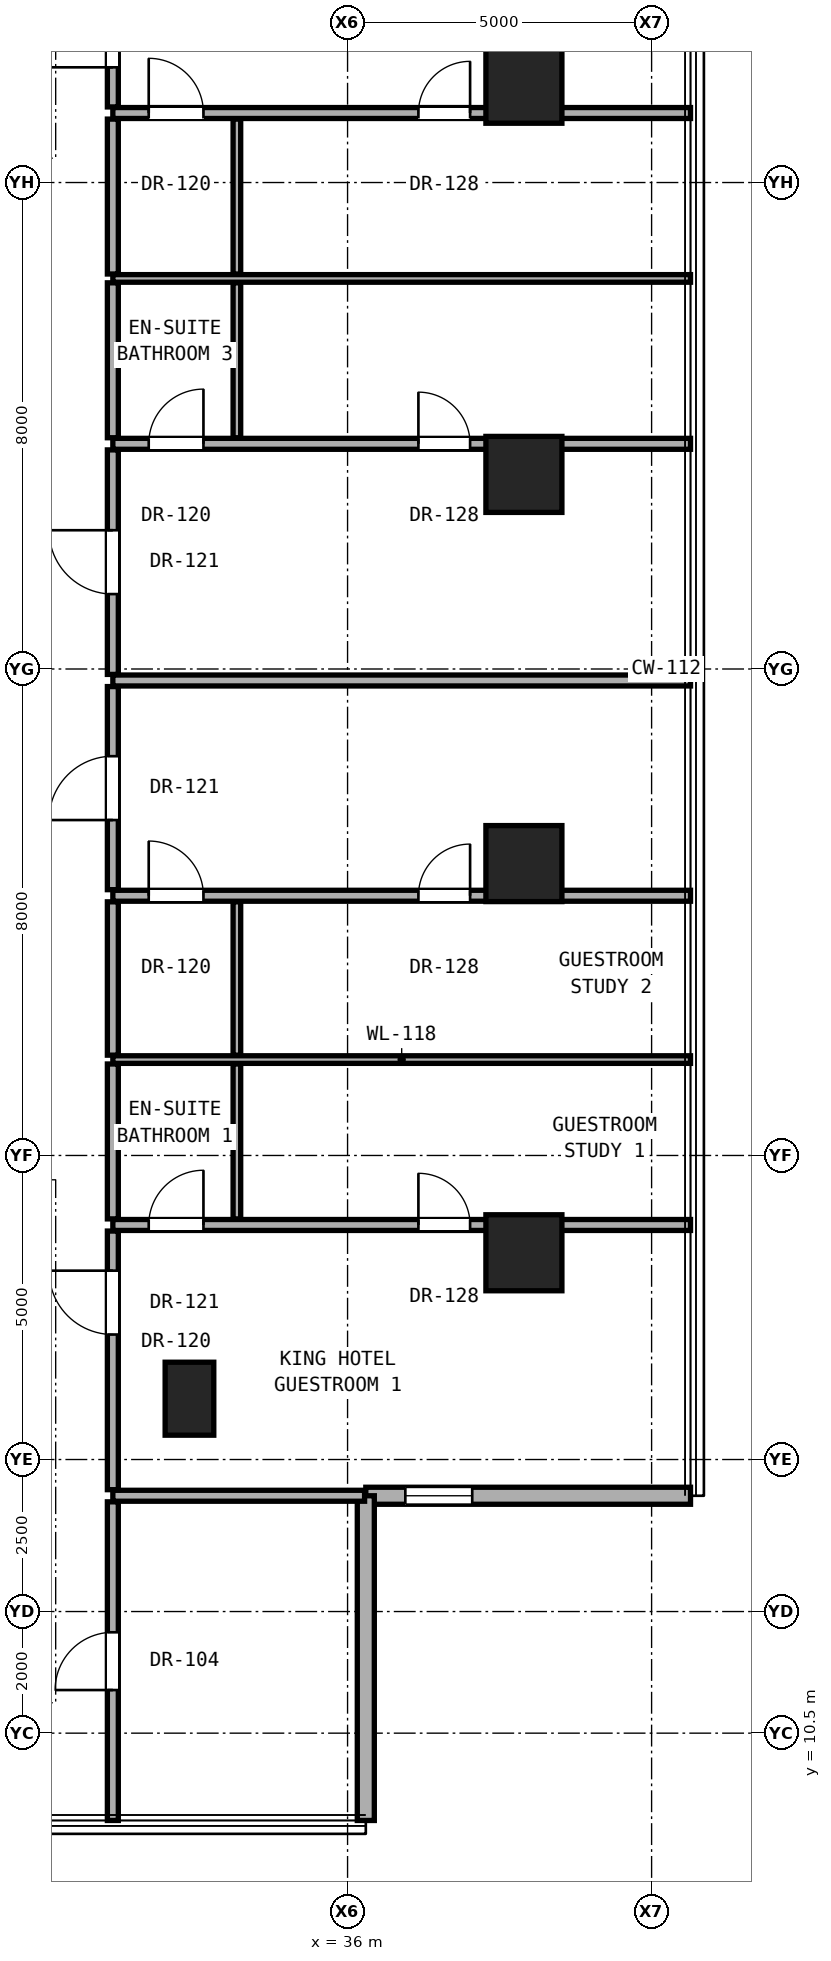
"""IFC4 building model, lengths in metres.
Left out: names, types, materials, properties, quantities, classifications, styles, units other than length and angle.
Written with IfcOpenShell. Run it as: python <this file> out.ifc"""

import sys

from ifc_helpers import new_model, si_unit, direction, frame, frame_2d, origin, origin_2d, place, context, subcontext, project, spatial, rectangle, hollow_rectangle, extrude, element, fill, save


model = new_model("IFC4")
c1 = context("Model", 3, precision=1e-05, world=origin(), true_north=direction((0.0, 1.0)))
c2 = subcontext(c1, "Body", "Model", "MODEL_VIEW")
j1 = project(units=[si_unit("LENGTHUNIT", "METRE"), si_unit("PLANEANGLEUNIT", "RADIAN")], contexts=[c1])
p1 = place(None, origin())
s1 = spatial("IfcSite", under=j1, at=p1, CompositionType="ELEMENT")
p2 = place(p1, origin())
s2 = spatial("IfcBuilding", under=s1, at=p2, CompositionType="ELEMENT")
p3 = place(p2, frame((0.0, 0.0, 58.7)))
s3 = spatial("IfcBuildingStorey", under=s2, at=p3, CompositionType="ELEMENT", Elevation=58.7)
for number, where, z_axis, x_axis in (
    (1, (38.9, 18.4, 0.0), (0.0, 0.0, 1.0), (1.0, 0.0, 0.0)),
    (2, (38.9, 24.8, 0.0), (0.0, 0.0, 1.0), (1.0, 0.0, 0.0)),
    (3, (38.9, 31.2, 0.0), (0.0, 0.0, 1.0), (1.0, 0.0, 0.0)),
    (4, (38.9, 37.6, 0.0), (0.0, 0.0, 1.0), (1.0, 0.0, 0.0)),
):
    element("IfcColumn", number, at=place(p3, frame(where, z_axis=z_axis, x_axis=x_axis)), inside=s3, PredefinedType="COLUMN", context=c2, shape_type="SweptSolid", body=[
        extrude(hollow_rectangle(XDim=1.25, YDim=1.25, WallThickness=0.07, at=origin_2d()), origin(), (0.0, 0.0, 1.0), 3.3),
    ])
p4 = place(p3, frame((33.4, 16.0, 0.0), z_axis=(0.0, 0.0, 1.0), x_axis=(1.0, 0.0, 0.0)))
e5 = element("IfcColumn", 5, at=p4, inside=s3, PredefinedType="PILASTER", context=c2, shape_type="SweptSolid", body=[
    extrude(rectangle(XDim=0.8, YDim=1.2, at=origin_2d()), origin(), (0.0, 0.0, 1.0), 3.3),
])
p5 = place(p3, frame((36.3, 14.404, 0.0), z_axis=(0.0, 0.0, 1.0), x_axis=(1.0, 0.0, 0.0)))
e6 = element("IfcWall", 6, at=p5, inside=s3, PredefinedType="SOLIDWALL", context=c2, shape_type="SweptSolid", body=[
    extrude(rectangle(XDim=5.34, YDim=0.28, at=frame_2d((2.67, 0.0))), origin(), (0.0, 0.0, 1.0), 3.04),
])
p6 = place(p5, frame((0.65, 0.0, 0.85)))
e7 = element("IfcOpeningElement", 7, at=p6, cuts=e6, PredefinedType="OPENING", context=c2, shape_type="SweptSolid", body=[
    extrude(rectangle(XDim=1.1, YDim=2.0, at=frame_2d((0.55, 1.0))), frame((0.0, 0.15, 0.0), z_axis=(0.0, -1.0, 0.0), x_axis=(1.0, 0.0, 0.0)), (0.0, 0.0, 1.0), 0.3),
])
p7 = place(p3, frame((36.3, 9.064, 0.0), z_axis=(0.0, 0.0, 1.0), x_axis=(0.0, 1.0, 0.0)))
e8 = element("IfcWall", 8, at=p7, inside=s3, PredefinedType="SOLIDWALL", context=c2, shape_type="SweptSolid", body=[
    extrude(rectangle(XDim=5.34, YDim=0.28, at=frame_2d((2.67, 0.0))), origin(), (0.0, 0.0, 1.0), 3.04),
])
p8 = place(p3, frame((32.14, 14.404, 0.0), z_axis=(0.0, 0.0, 1.0), x_axis=(1.0, 0.0, 0.0)))
e9 = element("IfcWall", 9, at=p8, inside=s3, PredefinedType="PARTITIONING", context=c2, shape_type="SweptSolid", body=[
    extrude(rectangle(XDim=4.14, YDim=0.18, at=frame_2d((2.07, 0.0))), origin(), (0.0, 0.0, 1.0), 3.06),
])
p9 = place(p3, frame((32.14, 18.857, 0.0), z_axis=(0.0, 0.0, 1.0), x_axis=(1.0, 0.0, 0.0)))
e10 = element("IfcWall", 10, at=p9, inside=s3, PredefinedType="PARTITIONING", context=c2, shape_type="SweptSolid", body=[
    extrude(rectangle(XDim=9.5, YDim=0.18, at=frame_2d((4.75, 0.0))), origin(), (0.0, 0.0, 1.0), 2.125),
])
p10 = place(p9, frame((5.025, 0.0, 0.0)))
e11 = element("IfcOpeningElement", 11, at=p10, cuts=e10, PredefinedType="OPENING", context=c2, shape_type="SweptSolid", body=[
    extrude(rectangle(XDim=0.85, YDim=2.01, at=frame_2d((0.425, 1.005))), frame((0.0, 0.1, 0.0), z_axis=(0.0, -1.0, 0.0), x_axis=(1.0, 0.0, 0.0)), (0.0, 0.0, 1.0), 0.2),
])
p11 = place(p9, frame((0.59, 0.0, 0.0)))
e12 = element("IfcOpeningElement", 12, at=p11, cuts=e10, PredefinedType="OPENING", context=c2, shape_type="SweptSolid", body=[
    extrude(rectangle(XDim=0.9, YDim=2.1, at=frame_2d((0.45, 1.05))), frame((0.0, 0.1, 0.0), z_axis=(0.0, -1.0, 0.0), x_axis=(1.0, 0.0, 0.0)), (0.0, 0.0, 1.0), 0.2),
])
p12 = place(p3, frame((32.14, 21.577, 0.0), z_axis=(0.0, 0.0, 1.0), x_axis=(1.0, 0.0, 0.0)))
e13 = element("IfcWall", 13, at=p12, inside=s3, PredefinedType="PARTITIONING", context=c2, shape_type="SweptSolid", body=[
    extrude(rectangle(XDim=9.5, YDim=0.125, at=frame_2d((4.75, 0.0))), origin(), (0.0, 0.0, 1.0), 2.125),
])
p13 = place(p3, frame((32.14, 24.271, 0.0), z_axis=(0.0, 0.0, 1.0), x_axis=(1.0, 0.0, 0.0)))
e14 = element("IfcWall", 14, at=p13, inside=s3, PredefinedType="PARTITIONING", context=c2, shape_type="SweptSolid", body=[
    extrude(rectangle(XDim=9.5, YDim=0.18, at=frame_2d((4.75, 0.0))), origin(), (0.0, 0.0, 1.0), 2.125),
])
p14 = place(p13, frame((5.025, 0.0, 0.0)))
e15 = element("IfcOpeningElement", 15, at=p14, cuts=e14, PredefinedType="OPENING", context=c2, shape_type="SweptSolid", body=[
    extrude(rectangle(XDim=0.85, YDim=2.01, at=frame_2d((0.425, 1.005))), frame((0.0, 0.1, 0.0), z_axis=(0.0, -1.0, 0.0), x_axis=(1.0, 0.0, 0.0)), (0.0, 0.0, 1.0), 0.2),
])
p15 = place(p13, frame((0.59, 0.0, 0.0)))
e16 = element("IfcOpeningElement", 16, at=p15, cuts=e14, PredefinedType="OPENING", context=c2, shape_type="SweptSolid", body=[
    extrude(rectangle(XDim=0.9, YDim=2.1, at=frame_2d((0.45, 1.05))), frame((0.0, 0.1, 0.0), z_axis=(0.0, -1.0, 0.0), x_axis=(1.0, 0.0, 0.0)), (0.0, 0.0, 1.0), 0.2),
])
p16 = place(p3, frame((32.14, 27.811, 0.0), z_axis=(0.0, 0.0, 1.0), x_axis=(1.0, 0.0, 0.0)))
e17 = element("IfcWall", 17, at=p16, inside=s3, PredefinedType="PARTITIONING", context=c2, shape_type="SweptSolid", body=[
    extrude(rectangle(XDim=9.5, YDim=0.18, at=frame_2d((4.75, 0.0))), origin(), (0.0, 0.0, 1.0), 2.125),
])
p17 = place(p3, frame((32.14, 31.703, 0.0), z_axis=(0.0, 0.0, 1.0), x_axis=(1.0, 0.0, 0.0)))
e18 = element("IfcWall", 18, at=p17, inside=s3, PredefinedType="PARTITIONING", context=c2, shape_type="SweptSolid", body=[
    extrude(rectangle(XDim=9.5, YDim=0.18, at=frame_2d((4.75, 0.0))), origin(), (0.0, 0.0, 1.0), 2.125),
])
p18 = place(p17, frame((5.025, 0.0, 0.0)))
e19 = element("IfcOpeningElement", 19, at=p18, cuts=e18, PredefinedType="OPENING", context=c2, shape_type="SweptSolid", body=[
    extrude(rectangle(XDim=0.85, YDim=2.01, at=frame_2d((0.425, 1.005))), frame((0.0, 0.1, 0.0), z_axis=(0.0, -1.0, 0.0), x_axis=(1.0, 0.0, 0.0)), (0.0, 0.0, 1.0), 0.2),
])
p19 = place(p17, frame((0.59, 0.0, 0.0)))
e20 = element("IfcOpeningElement", 20, at=p19, cuts=e18, PredefinedType="OPENING", context=c2, shape_type="SweptSolid", body=[
    extrude(rectangle(XDim=0.9, YDim=2.1, at=frame_2d((0.45, 1.05))), frame((0.0, 0.1, 0.0), z_axis=(0.0, -1.0, 0.0), x_axis=(1.0, 0.0, 0.0)), (0.0, 0.0, 1.0), 0.2),
])
p20 = place(p3, frame((32.14, 34.423, 0.0), z_axis=(0.0, 0.0, 1.0), x_axis=(1.0, 0.0, 0.0)))
e21 = element("IfcWall", 21, at=p20, inside=s3, PredefinedType="PARTITIONING", context=c2, shape_type="SweptSolid", body=[
    extrude(rectangle(XDim=9.5, YDim=0.125, at=frame_2d((4.75, 0.0))), origin(), (0.0, 0.0, 1.0), 2.125),
])
p21 = place(p3, frame((32.14, 37.143, 0.0), z_axis=(0.0, 0.0, 1.0), x_axis=(1.0, 0.0, 0.0)))
e22 = element("IfcWall", 22, at=p21, inside=s3, PredefinedType="PARTITIONING", context=c2, shape_type="SweptSolid", body=[
    extrude(rectangle(XDim=9.5, YDim=0.18, at=frame_2d((4.75, 0.0))), origin(), (0.0, 0.0, 1.0), 2.125),
])
p22 = place(p21, frame((5.025, 0.0, 0.0)))
e23 = element("IfcOpeningElement", 23, at=p22, cuts=e22, PredefinedType="OPENING", context=c2, shape_type="SweptSolid", body=[
    extrude(rectangle(XDim=0.85, YDim=2.01, at=frame_2d((0.425, 1.005))), frame((0.0, 0.1, 0.0), z_axis=(0.0, -1.0, 0.0), x_axis=(1.0, 0.0, 0.0)), (0.0, 0.0, 1.0), 0.2),
])
p23 = place(p21, frame((0.59, 0.0, 0.0)))
e24 = element("IfcOpeningElement", 24, at=p23, cuts=e22, PredefinedType="OPENING", context=c2, shape_type="SweptSolid", body=[
    extrude(rectangle(XDim=0.9, YDim=2.1, at=frame_2d((0.45, 1.05))), frame((0.0, 0.1, 0.0), z_axis=(0.0, -1.0, 0.0), x_axis=(1.0, 0.0, 0.0)), (0.0, 0.0, 1.0), 0.2),
])
p24 = place(p3, frame((32.14, 9.064, 0.0), z_axis=(0.0, 0.0, 1.0), x_axis=(0.0, 1.0, 0.0)))
e25 = element("IfcWall", 25, at=p24, inside=s3, PredefinedType="PARTITIONING", context=c2, shape_type="SweptSolid", body=[
    extrude(rectangle(XDim=5.24, YDim=0.18, at=frame_2d((2.62, 0.0))), origin(), (0.0, 0.0, 1.0), 3.06),
])
p25 = place(p24, frame((2.145, 0.0, 0.0)))
e26 = element("IfcOpeningElement", 26, at=p25, cuts=e25, PredefinedType="OPENING", context=c2, shape_type="SweptSolid", body=[
    extrude(rectangle(XDim=0.95, YDim=2.15, at=frame_2d((0.475, 1.075))), frame((0.0, 0.1, 0.0), z_axis=(0.0, -1.0, 0.0), x_axis=(1.0, 0.0, 0.0)), (0.0, 0.0, 1.0), 0.2),
])
p26 = place(p3, frame((32.14, 14.504, 0.0), z_axis=(0.0, 0.0, 1.0), x_axis=(0.0, 1.0, 0.0)))
e27 = element("IfcWall", 27, at=p26, inside=s3, PredefinedType="PARTITIONING", context=c2, shape_type="SweptSolid", body=[
    extrude(rectangle(XDim=4.253, YDim=0.18, at=frame_2d((2.126, 0.0))), origin(), (0.0, 0.0, 1.0), 2.436),
])
p27 = place(p26, frame((2.552, 0.0, 0.0)))
e28 = element("IfcOpeningElement", 28, at=p27, cuts=e27, PredefinedType="OPENING", context=c2, shape_type="SweptSolid", body=[
    extrude(rectangle(XDim=1.05, YDim=2.2, at=frame_2d((0.525, 1.1))), frame((0.0, 0.1, 0.0), z_axis=(0.0, -1.0, 0.0), x_axis=(1.0, 0.0, 0.0)), (0.0, 0.0, 1.0), 0.2),
])
p28 = place(p3, frame((32.14, 18.957, 0.0), z_axis=(0.0, 0.0, 1.0), x_axis=(0.0, 1.0, 0.0)))
e29 = element("IfcWall", 29, at=p28, inside=s3, PredefinedType="PARTITIONING", context=c2, shape_type="SweptSolid", body=[
    extrude(rectangle(XDim=2.547, YDim=0.18, at=frame_2d((1.274, 0.0))), origin(), (0.0, 0.0, 1.0), 3.06),
])
p29 = place(p3, frame((32.14, 21.649, 0.0), z_axis=(0.0, 0.0, 1.0), x_axis=(0.0, 1.0, 0.0)))
e30 = element("IfcWall", 30, at=p29, inside=s3, PredefinedType="PARTITIONING", context=c2, shape_type="SweptSolid", body=[
    extrude(rectangle(XDim=2.521, YDim=0.18, at=frame_2d((1.261, 0.0))), origin(), (0.0, 0.0, 1.0), 3.06),
])
p30 = place(p3, frame((32.14, 24.371, 0.0), z_axis=(0.0, 0.0, 1.0), x_axis=(0.0, 1.0, 0.0)))
e31 = element("IfcWall", 31, at=p30, inside=s3, PredefinedType="PARTITIONING", context=c2, shape_type="SweptSolid", body=[
    extrude(rectangle(XDim=3.34, YDim=0.18, at=frame_2d((1.67, 0.0))), origin(), (0.0, 0.0, 1.0), 2.279),
])
p31 = place(p30, frame((1.145, 0.0, 0.0)))
e32 = element("IfcOpeningElement", 32, at=p31, cuts=e31, PredefinedType="OPENING", context=c2, shape_type="SweptSolid", body=[
    extrude(rectangle(XDim=1.05, YDim=2.2, at=frame_2d((0.525, 1.1))), frame((0.0, 0.1, 0.0), z_axis=(0.0, -1.0, 0.0), x_axis=(1.0, 0.0, 0.0)), (0.0, 0.0, 1.0), 0.2),
])
p32 = place(p3, frame((32.14, 27.911, 0.0), z_axis=(0.0, 0.0, 1.0), x_axis=(0.0, 1.0, 0.0)))
e33 = element("IfcWall", 33, at=p32, inside=s3, PredefinedType="PARTITIONING", context=c2, shape_type="SweptSolid", body=[
    extrude(rectangle(XDim=3.692, YDim=0.18, at=frame_2d((1.846, 0.0))), origin(), (0.0, 0.0, 1.0), 2.279),
])
p33 = place(p32, frame((1.321, 0.0, 0.0)))
e34 = element("IfcOpeningElement", 34, at=p33, cuts=e33, PredefinedType="OPENING", context=c2, shape_type="SweptSolid", body=[
    extrude(rectangle(XDim=1.05, YDim=2.2, at=frame_2d((0.525, 1.1))), frame((0.0, 0.1, 0.0), z_axis=(0.0, -1.0, 0.0), x_axis=(1.0, 0.0, 0.0)), (0.0, 0.0, 1.0), 0.2),
])
p34 = place(p3, frame((32.14, 31.803, 0.0), z_axis=(0.0, 0.0, 1.0), x_axis=(0.0, 1.0, 0.0)))
e35 = element("IfcWall", 35, at=p34, inside=s3, PredefinedType="PARTITIONING", context=c2, shape_type="SweptSolid", body=[
    extrude(rectangle(XDim=2.548, YDim=0.18, at=frame_2d((1.274, 0.0))), origin(), (0.0, 0.0, 1.0), 3.06),
])
p35 = place(p3, frame((32.14, 34.496, 0.0), z_axis=(0.0, 0.0, 1.0), x_axis=(0.0, 1.0, 0.0)))
e36 = element("IfcWall", 36, at=p35, inside=s3, PredefinedType="PARTITIONING", context=c2, shape_type="SweptSolid", body=[
    extrude(rectangle(XDim=2.547, YDim=0.18, at=frame_2d((1.274, 0.0))), origin(), (0.0, 0.0, 1.0), 3.06),
])
p36 = place(p3, frame((32.14, 37.243, 0.0), z_axis=(0.0, 0.0, 1.0), x_axis=(0.0, 1.0, 0.0)))
e37 = element("IfcWall", 37, at=p36, inside=s3, PredefinedType="PARTITIONING", context=c2, shape_type="SweptSolid", body=[
    extrude(rectangle(XDim=4.253, YDim=0.18, at=frame_2d((2.126, 0.0))), origin(), (0.0, 0.0, 1.0), 2.436),
])
p37 = place(p36, frame((0.652, 0.0, 0.0)))
e38 = element("IfcOpeningElement", 38, at=p37, cuts=e37, PredefinedType="OPENING", context=c2, shape_type="SweptSolid", body=[
    extrude(rectangle(XDim=1.05, YDim=2.2, at=frame_2d((0.525, 1.1))), frame((0.0, 0.1, 0.0), z_axis=(0.0, -1.0, 0.0), x_axis=(1.0, 0.0, 0.0)), (0.0, 0.0, 1.0), 0.2),
])
p38 = place(p3, frame((34.18, 18.957, 0.0), z_axis=(0.0, 0.0, 1.0), x_axis=(0.0, 1.0, 0.0)))
e39 = element("IfcWall", 39, at=p38, inside=s3, PredefinedType="PARTITIONING", context=c2, shape_type="SweptSolid", body=[
    extrude(rectangle(XDim=2.547, YDim=0.125, at=frame_2d((1.274, 0.0))), origin(), (0.0, 0.0, 1.0), 3.06),
])
p39 = place(p3, frame((34.18, 21.649, 0.0), z_axis=(0.0, 0.0, 1.0), x_axis=(0.0, 1.0, 0.0)))
e40 = element("IfcWall", 40, at=p39, inside=s3, PredefinedType="PARTITIONING", context=c2, shape_type="SweptSolid", body=[
    extrude(rectangle(XDim=2.521, YDim=0.125, at=frame_2d((1.261, 0.0))), origin(), (0.0, 0.0, 1.0), 3.06),
])
p40 = place(p3, frame((34.18, 31.803, 0.0), z_axis=(0.0, 0.0, 1.0), x_axis=(0.0, 1.0, 0.0)))
e41 = element("IfcWall", 41, at=p40, inside=s3, PredefinedType="PARTITIONING", context=c2, shape_type="SweptSolid", body=[
    extrude(rectangle(XDim=2.548, YDim=0.125, at=frame_2d((1.274, 0.0))), origin(), (0.0, 0.0, 1.0), 3.06),
])
p41 = place(p3, frame((34.18, 34.496, 0.0), z_axis=(0.0, 0.0, 1.0), x_axis=(0.0, 1.0, 0.0)))
e42 = element("IfcWall", 42, at=p41, inside=s3, PredefinedType="PARTITIONING", context=c2, shape_type="SweptSolid", body=[
    extrude(rectangle(XDim=2.547, YDim=0.125, at=frame_2d((1.274, 0.0))), origin(), (0.0, 0.0, 1.0), 3.06),
])
p42 = place(p6, origin())
e43 = element("IfcWindow", 43, at=p42, inside=s3, PartitioningType="SINGLE_PANEL", PredefinedType="WINDOW", context=c2, shape_type="SweptSolid", body=[
    extrude(rectangle(XDim=1.1, YDim=2.0, at=frame_2d((0.55, 1.0))), frame((0.0, 0.03, 0.0), z_axis=(0.0, -1.0, 0.0), x_axis=(1.0, 0.0, 0.0)), (0.0, 0.0, 1.0), 0.06),
])
fill(e7, e43)
p43 = place(p27, origin())
e44 = element("IfcDoor", 44, at=p43, inside=s3, OperationType="SINGLE_SWING_RIGHT", PredefinedType="DOOR", context=c2, shape_type="SweptSolid", body=[
    extrude(rectangle(XDim=1.05, YDim=2.2, at=frame_2d((0.525, 1.1))), frame((0.0, 0.025, 0.0), z_axis=(0.0, -1.0, 0.0), x_axis=(1.0, 0.0, 0.0)), (0.0, 0.0, 1.0), 0.05),
])
fill(e28, e44)
p44 = place(p10, origin())
e45 = element("IfcDoor", 45, at=p44, inside=s3, OperationType="SINGLE_SWING_LEFT", PredefinedType="DOOR", context=c2, shape_type="SweptSolid", body=[
    extrude(rectangle(XDim=0.85, YDim=2.01, at=frame_2d((0.425, 1.005))), frame((0.0, 0.025, 0.0), z_axis=(0.0, -1.0, 0.0), x_axis=(1.0, 0.0, 0.0)), (0.0, 0.0, 1.0), 0.05),
])
fill(e11, e45)
p45 = place(p11, origin())
e46 = element("IfcDoor", 46, at=p45, inside=s3, OperationType="SINGLE_SWING_RIGHT", PredefinedType="DOOR", context=c2, shape_type="SweptSolid", body=[
    extrude(rectangle(XDim=0.9, YDim=2.1, at=frame_2d((0.45, 1.05))), frame((0.0, 0.025, 0.0), z_axis=(0.0, -1.0, 0.0), x_axis=(1.0, 0.0, 0.0)), (0.0, 0.0, 1.0), 0.05),
])
fill(e12, e46)
p46 = place(p31, origin())
e47 = element("IfcDoor", 47, at=p46, inside=s3, OperationType="SINGLE_SWING_LEFT", PredefinedType="DOOR", context=c2, shape_type="SweptSolid", body=[
    extrude(rectangle(XDim=1.05, YDim=2.2, at=frame_2d((0.525, 1.1))), frame((0.0, 0.025, 0.0), z_axis=(0.0, -1.0, 0.0), x_axis=(1.0, 0.0, 0.0)), (0.0, 0.0, 1.0), 0.05),
])
fill(e32, e47)
p47 = place(p14, origin())
e48 = element("IfcDoor", 48, at=p47, inside=s3, OperationType="SINGLE_SWING_RIGHT", PredefinedType="DOOR", context=c2, shape_type="SweptSolid", body=[
    extrude(rectangle(XDim=0.85, YDim=2.01, at=frame_2d((0.425, 1.005))), frame((0.0, 0.025, 0.0), z_axis=(0.0, -1.0, 0.0), x_axis=(1.0, 0.0, 0.0)), (0.0, 0.0, 1.0), 0.05),
])
fill(e15, e48)
p48 = place(p15, origin())
e49 = element("IfcDoor", 49, at=p48, inside=s3, OperationType="SINGLE_SWING_LEFT", PredefinedType="DOOR", context=c2, shape_type="SweptSolid", body=[
    extrude(rectangle(XDim=0.9, YDim=2.1, at=frame_2d((0.45, 1.05))), frame((0.0, 0.025, 0.0), z_axis=(0.0, -1.0, 0.0), x_axis=(1.0, 0.0, 0.0)), (0.0, 0.0, 1.0), 0.05),
])
fill(e16, e49)
p49 = place(p33, origin())
e50 = element("IfcDoor", 50, at=p49, inside=s3, OperationType="SINGLE_SWING_RIGHT", PredefinedType="DOOR", context=c2, shape_type="SweptSolid", body=[
    extrude(rectangle(XDim=1.05, YDim=2.2, at=frame_2d((0.525, 1.1))), frame((0.0, 0.025, 0.0), z_axis=(0.0, -1.0, 0.0), x_axis=(1.0, 0.0, 0.0)), (0.0, 0.0, 1.0), 0.05),
])
fill(e34, e50)
p50 = place(p18, origin())
e51 = element("IfcDoor", 51, at=p50, inside=s3, OperationType="SINGLE_SWING_LEFT", PredefinedType="DOOR", context=c2, shape_type="SweptSolid", body=[
    extrude(rectangle(XDim=0.85, YDim=2.01, at=frame_2d((0.425, 1.005))), frame((0.0, 0.025, 0.0), z_axis=(0.0, -1.0, 0.0), x_axis=(1.0, 0.0, 0.0)), (0.0, 0.0, 1.0), 0.05),
])
fill(e19, e51)
p51 = place(p19, origin())
e52 = element("IfcDoor", 52, at=p51, inside=s3, OperationType="SINGLE_SWING_RIGHT", PredefinedType="DOOR", context=c2, shape_type="SweptSolid", body=[
    extrude(rectangle(XDim=0.9, YDim=2.1, at=frame_2d((0.45, 1.05))), frame((0.0, 0.025, 0.0), z_axis=(0.0, -1.0, 0.0), x_axis=(1.0, 0.0, 0.0)), (0.0, 0.0, 1.0), 0.05),
])
fill(e20, e52)
p52 = place(p37, origin())
e53 = element("IfcDoor", 53, at=p52, inside=s3, OperationType="SINGLE_SWING_LEFT", PredefinedType="DOOR", context=c2, shape_type="SweptSolid", body=[
    extrude(rectangle(XDim=1.05, YDim=2.2, at=frame_2d((0.525, 1.1))), frame((0.0, 0.025, 0.0), z_axis=(0.0, -1.0, 0.0), x_axis=(1.0, 0.0, 0.0)), (0.0, 0.0, 1.0), 0.05),
])
fill(e38, e53)
p53 = place(p22, origin())
e54 = element("IfcDoor", 54, at=p53, inside=s3, OperationType="SINGLE_SWING_RIGHT", PredefinedType="DOOR", context=c2, shape_type="SweptSolid", body=[
    extrude(rectangle(XDim=0.85, YDim=2.01, at=frame_2d((0.425, 1.005))), frame((0.0, 0.025, 0.0), z_axis=(0.0, -1.0, 0.0), x_axis=(1.0, 0.0, 0.0)), (0.0, 0.0, 1.0), 0.05),
])
fill(e23, e54)
p54 = place(p23, origin())
e55 = element("IfcDoor", 55, at=p54, inside=s3, OperationType="SINGLE_SWING_LEFT", PredefinedType="DOOR", context=c2, shape_type="SweptSolid", body=[
    extrude(rectangle(XDim=0.9, YDim=2.1, at=frame_2d((0.45, 1.05))), frame((0.0, 0.025, 0.0), z_axis=(0.0, -1.0, 0.0), x_axis=(1.0, 0.0, 0.0)), (0.0, 0.0, 1.0), 0.05),
])
fill(e24, e55)
p55 = place(p25, origin())
e56 = element("IfcDoor", 56, at=p55, inside=s3, OperationType="SINGLE_SWING_LEFT", PredefinedType="DOOR", context=c2, shape_type="SweptSolid", body=[
    extrude(rectangle(XDim=0.95, YDim=2.15, at=frame_2d((0.475, 1.075))), frame((0.0, 0.025, 0.0), z_axis=(0.0, -1.0, 0.0), x_axis=(1.0, 0.0, 0.0)), (0.0, 0.0, 1.0), 0.05),
])
fill(e26, e56)
save(model, sys.argv[1])
